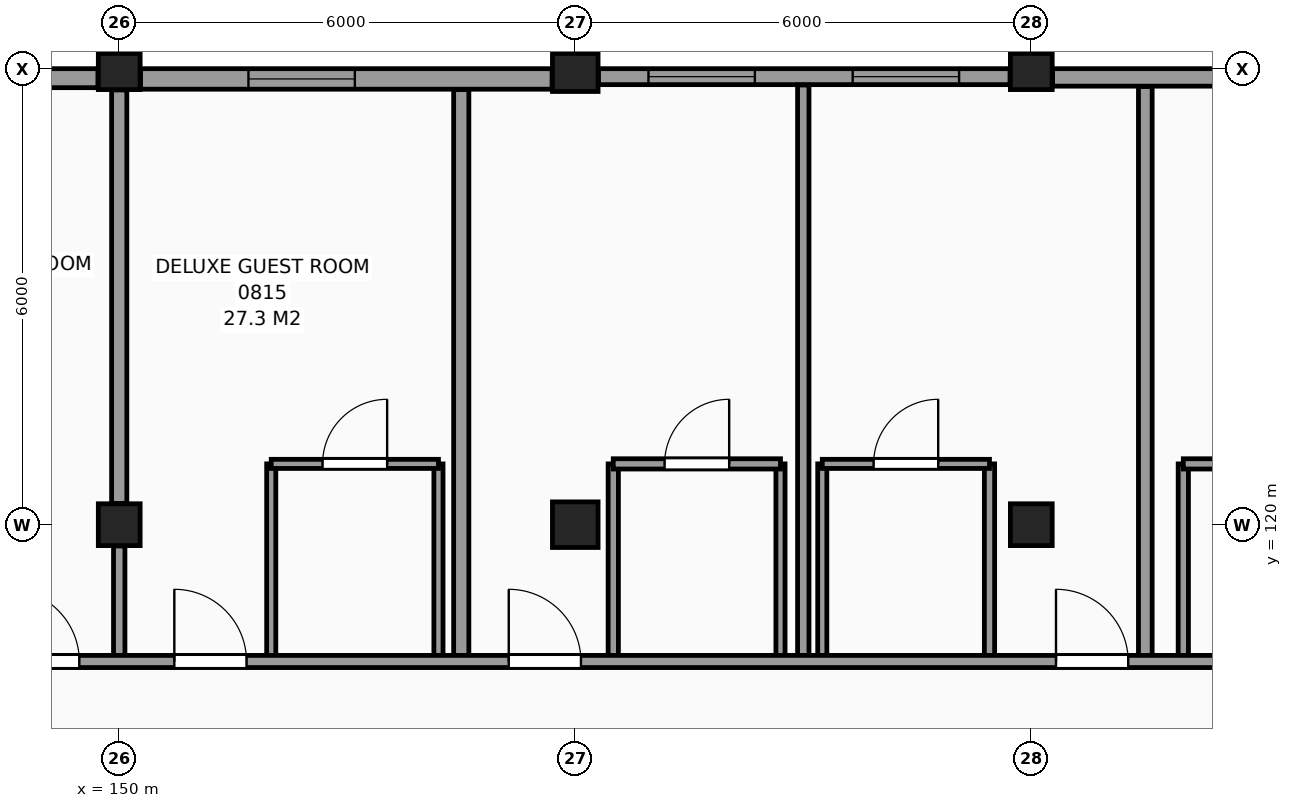
"""IFC4 building model, lengths in metres.
Left out: names, types, materials, properties, quantities, classifications, styles, units other than length and angle.
Written with IfcOpenShell. Run it as: python <this file> out.ifc"""

import sys

from ifc_helpers import new_model, si_unit, direction, frame, frame_2d, origin, origin_2d, place, context, subcontext, project, spatial, rectangle, extrude, element, fill, save


model = new_model("IFC4")
c1 = context("Model", 3, precision=1e-05, world=origin(), true_north=direction((0.0, 1.0)))
c2 = subcontext(c1, "Body", "Model", "MODEL_VIEW")
j1 = project(units=[si_unit("LENGTHUNIT", "METRE"), si_unit("PLANEANGLEUNIT", "RADIAN")], contexts=[c1])
p1 = place(None, origin())
s1 = spatial("IfcSite", under=j1, at=p1, CompositionType="ELEMENT")
p2 = place(p1, origin())
s2 = spatial("IfcBuilding", under=s1, at=p2, CompositionType="ELEMENT")
p3 = place(p2, frame((0.0, 0.0, 34.8)))
s3 = spatial("IfcBuildingStorey", under=s2, at=p3, CompositionType="ELEMENT", Elevation=34.8)
for number, where, z_axis, x_axis in (
    (1, (150.0, 120.0, 0.0), (0.0, 0.0, 1.0), (1.0, 0.0, 0.0)),
    (2, (150.0, 126.0, 0.0), (0.0, 0.0, 1.0), (1.0, 0.0, 0.0)),
):
    element("IfcColumn", number, at=place(p3, frame(where, z_axis=z_axis, x_axis=x_axis)), inside=s3, PredefinedType="COLUMN", context=c2, shape_type="SweptSolid", body=[
        extrude(rectangle(XDim=0.55, YDim=0.55, at=origin_2d()), origin(), (0.0, 0.0, 1.0), 3.3),
    ])
for number, where, z_axis, x_axis in (
    (3, (156.0, 120.0, 0.0), (0.0, 0.0, 1.0), (1.0, 0.0, 0.0)),
    (4, (156.0, 126.0, 0.0), (0.0, 0.0, 1.0), (1.0, 0.0, 0.0)),
):
    element("IfcColumn", number, at=place(p3, frame(where, z_axis=z_axis, x_axis=x_axis)), inside=s3, PredefinedType="COLUMN", context=c2, shape_type="SweptSolid", body=[
        extrude(rectangle(XDim=0.6, YDim=0.6, at=origin_2d()), origin(), (0.0, 0.0, 1.0), 3.3),
    ])
for number, where, z_axis, x_axis in (
    (5, (162.0, 120.0, 0.0), (0.0, 0.0, 1.0), (1.0, 0.0, 0.0)),
    (6, (162.0, 126.0, 0.0), (0.0, 0.0, 1.0), (1.0, 0.0, 0.0)),
):
    element("IfcColumn", number, at=place(p3, frame(where, z_axis=z_axis, x_axis=x_axis)), inside=s3, PredefinedType="COLUMN", context=c2, shape_type="SweptSolid", body=[
        extrude(rectangle(XDim=0.55, YDim=0.55, at=origin_2d()), origin(), (0.0, 0.0, 1.0), 3.3),
    ])
p4 = place(p3, frame((167.695, 125.885, 0.0), z_axis=(0.0, 0.0, 1.0), x_axis=(-1.0, 0.0, 0.0)))
e7 = element("IfcWall", 7, at=p4, inside=s3, PredefinedType="SOLIDWALL", context=c2, shape_type="SweptSolid", body=[
    extrude(rectangle(XDim=5.415, YDim=0.23, at=frame_2d((2.708, 0.0))), origin(), (0.0, 0.0, 1.0), 2.42),
])
p5 = place(p3, frame((161.72, 125.895, 0.0), z_axis=(0.0, 0.0, 1.0), x_axis=(-1.0, 0.0, 0.0)))
e8 = element("IfcWall", 8, at=p5, inside=s3, PredefinedType="SOLIDWALL", context=c2, shape_type="SweptSolid", body=[
    extrude(rectangle(XDim=5.415, YDim=0.21, at=frame_2d((2.708, 0.0))), origin(), (0.0, 0.0, 1.0), 2.42),
])
p6 = place(p5, frame((3.357, 0.0, 0.8)))
e9 = element("IfcOpeningElement", 9, at=p6, cuts=e8, PredefinedType="OPENING", context=c2, shape_type="SweptSolid", body=[
    extrude(rectangle(XDim=1.4, YDim=1.4, at=frame_2d((0.7, 0.7))), frame((0.0, 0.115, 0.0), z_axis=(0.0, -1.0, 0.0), x_axis=(1.0, 0.0, 0.0)), (0.0, 0.0, 1.0), 0.23),
])
p7 = place(p5, frame((0.67, 0.0, 0.8)))
e10 = element("IfcOpeningElement", 10, at=p7, cuts=e8, PredefinedType="OPENING", context=c2, shape_type="SweptSolid", body=[
    extrude(rectangle(XDim=1.4, YDim=1.4, at=frame_2d((0.7, 0.7))), frame((0.0, 0.115, 0.0), z_axis=(0.0, -1.0, 0.0), x_axis=(1.0, 0.0, 0.0)), (0.0, 0.0, 1.0), 0.23),
])
p8 = place(p3, frame((155.695, 125.865, 0.0), z_axis=(0.0, 0.0, 1.0), x_axis=(-1.0, 0.0, 0.0)))
e11 = element("IfcWall", 11, at=p8, inside=s3, PredefinedType="SOLIDWALL", context=c2, shape_type="SweptSolid", body=[
    extrude(rectangle(XDim=5.415, YDim=0.27, at=frame_2d((2.708, 0.0))), origin(), (0.0, 0.0, 1.0), 2.42),
])
p9 = place(p8, frame((2.595, 0.0, 0.8)))
e12 = element("IfcOpeningElement", 12, at=p9, cuts=e11, PredefinedType="OPENING", context=c2, shape_type="SweptSolid", body=[
    extrude(rectangle(XDim=1.4, YDim=1.4, at=frame_2d((0.7, 0.7))), frame((0.0, 0.145, 0.0), z_axis=(0.0, -1.0, 0.0), x_axis=(1.0, 0.0, 0.0)), (0.0, 0.0, 1.0), 0.29),
])
p10 = place(p3, frame((149.72, 125.875, 0.0), z_axis=(0.0, 0.0, 1.0), x_axis=(-1.0, 0.0, 0.0)))
e13 = element("IfcWall", 13, at=p10, inside=s3, PredefinedType="SOLIDWALL", context=c2, shape_type="SweptSolid", body=[
    extrude(rectangle(XDim=5.415, YDim=0.25, at=frame_2d((2.708, 0.0))), origin(), (0.0, 0.0, 1.0), 2.42),
])
p11 = place(p10, frame((1.42, 0.0, 0.8)))
e14 = element("IfcOpeningElement", 14, at=p11, cuts=e13, PredefinedType="OPENING", context=c2, shape_type="SweptSolid", body=[
    extrude(rectangle(XDim=1.4, YDim=1.4, at=frame_2d((0.7, 0.7))), frame((0.0, 0.135, 0.0), z_axis=(0.0, -1.0, 0.0), x_axis=(1.0, 0.0, 0.0)), (0.0, 0.0, 1.0), 0.27),
])
p12 = place(p3, frame((150.0, 118.2, 0.0), z_axis=(0.0, 0.0, 1.0), x_axis=(0.0, 1.0, 0.0)))
e15 = element("IfcWall", 15, at=p12, inside=s3, PredefinedType="PARTITIONING", context=c2, shape_type="SweptSolid", body=[
    extrude(rectangle(XDim=1.52, YDim=0.15, at=frame_2d((0.76, 0.0))), origin(), (0.0, 0.0, 1.0), 2.57),
])
p13 = place(p3, frame((150.0, 120.28, 0.0), z_axis=(0.0, 0.0, 1.0), x_axis=(0.0, 1.0, 0.0)))
e16 = element("IfcWall", 16, at=p13, inside=s3, PredefinedType="PARTITIONING", context=c2, shape_type="SweptSolid", body=[
    extrude(rectangle(XDim=5.44, YDim=0.2, at=frame_2d((2.72, 0.0))), origin(), (0.0, 0.0, 1.0), 2.73),
])
for number, where, z_axis, x_axis in (
    (17, (152.0, 118.2, 0.0), (0.0, 0.0, 1.0), (0.0, 1.0, 0.0)),
    (18, (154.2, 118.2, 0.0), (0.0, 0.0, 1.0), (0.0, 1.0, 0.0)),
):
    element("IfcWall", number, at=place(p3, frame(where, z_axis=z_axis, x_axis=x_axis)), inside=s3, PredefinedType="PARTITIONING", context=c2, shape_type="SweptSolid", body=[
        extrude(rectangle(XDim=2.6, YDim=0.12, at=frame_2d((1.3, 0.0))), origin(), (0.0, 0.0, 1.0), 3.07),
    ])
p14 = place(p3, frame((154.5, 118.2, 0.0), z_axis=(0.0, 0.0, 1.0), x_axis=(0.0, 1.0, 0.0)))
e19 = element("IfcWall", 19, at=p14, inside=s3, PredefinedType="PARTITIONING", context=c2, shape_type="SweptSolid", body=[
    extrude(rectangle(XDim=7.525, YDim=0.2, at=frame_2d((3.763, 0.0))), origin(), (0.0, 0.0, 1.0), 3.07),
])
p15 = place(p3, frame((156.5, 118.2, 0.0), z_axis=(0.0, 0.0, 1.0), x_axis=(0.0, 1.0, 0.0)))
e20 = element("IfcWall", 20, at=p15, inside=s3, PredefinedType="PARTITIONING", context=c2, shape_type="SweptSolid", body=[
    extrude(rectangle(XDim=2.6, YDim=0.135, at=frame_2d((1.3, 0.0))), origin(), (0.0, 0.0, 1.0), 3.07),
])
p16 = place(p3, frame((158.7, 118.2, 0.0), z_axis=(0.0, 0.0, 1.0), x_axis=(0.0, 1.0, 0.0)))
e21 = element("IfcWall", 21, at=p16, inside=s3, PredefinedType="PARTITIONING", context=c2, shape_type="SweptSolid", body=[
    extrude(rectangle(XDim=2.6, YDim=0.12, at=frame_2d((1.3, 0.0))), origin(), (0.0, 0.0, 1.0), 3.07),
])
p17 = place(p3, frame((159.0, 118.2, 0.0), z_axis=(0.0, 0.0, 1.0), x_axis=(0.0, 1.0, 0.0)))
e22 = element("IfcWall", 22, at=p17, inside=s3, PredefinedType="PARTITIONING", context=c2, shape_type="SweptSolid", body=[
    extrude(rectangle(XDim=7.585, YDim=0.15, at=frame_2d((3.792, 0.0))), origin(), (0.0, 0.0, 1.0), 3.07),
])
p18 = place(p3, frame((159.25, 118.2, 0.0), z_axis=(0.0, 0.0, 1.0), x_axis=(0.0, 1.0, 0.0)))
e23 = element("IfcWall", 23, at=p18, inside=s3, PredefinedType="PARTITIONING", context=c2, shape_type="SweptSolid", body=[
    extrude(rectangle(XDim=2.6, YDim=0.12, at=frame_2d((1.3, 0.0))), origin(), (0.0, 0.0, 1.0), 3.07),
])
p19 = place(p3, frame((161.45, 118.2, 0.0), z_axis=(0.0, 0.0, 1.0), x_axis=(0.0, 1.0, 0.0)))
e24 = element("IfcWall", 24, at=p19, inside=s3, PredefinedType="PARTITIONING", context=c2, shape_type="SweptSolid", body=[
    extrude(rectangle(XDim=2.6, YDim=0.135, at=frame_2d((1.3, 0.0))), origin(), (0.0, 0.0, 1.0), 3.07),
])
p20 = place(p3, frame((163.5, 118.2, 0.0), z_axis=(0.0, 0.0, 1.0), x_axis=(0.0, 1.0, 0.0)))
e25 = element("IfcWall", 25, at=p20, inside=s3, PredefinedType="PARTITIONING", context=c2, shape_type="SweptSolid", body=[
    extrude(rectangle(XDim=7.565, YDim=0.18, at=frame_2d((3.782, 0.0))), origin(), (0.0, 0.0, 1.0), 3.07),
])
p21 = place(p3, frame((164.0, 118.2, 0.0), z_axis=(0.0, 0.0, 1.0), x_axis=(0.0, 1.0, 0.0)))
e26 = element("IfcWall", 26, at=p21, inside=s3, PredefinedType="PARTITIONING", context=c2, shape_type="SweptSolid", body=[
    extrude(rectangle(XDim=2.6, YDim=0.135, at=frame_2d((1.3, 0.0))), origin(), (0.0, 0.0, 1.0), 3.07),
])
p22 = place(p3, frame((66.275, 118.2, 0.0), z_axis=(0.0, 0.0, 1.0), x_axis=(1.0, 0.0, 0.0)))
e27 = element("IfcWall", 27, at=p22, inside=s3, PredefinedType="PARTITIONING", context=c2, shape_type="SweptSolid", body=[
    extrude(rectangle(XDim=110.225, YDim=0.16, at=frame_2d((55.113, 0.0))), origin(), (0.0, 0.0, 1.0), 3.07),
])
p23 = place(p22, frame((0.45, 0.0, 0.0)))
e28 = element("IfcOpeningElement", 28, at=p23, cuts=e27, PredefinedType="OPENING", context=c2, shape_type="SweptSolid", body=[
    extrude(rectangle(XDim=0.95, YDim=2.1, at=frame_2d((0.475, 1.05))), frame((0.0, 0.09, 0.0), z_axis=(0.0, -1.0, 0.0), x_axis=(1.0, 0.0, 0.0)), (0.0, 0.0, 1.0), 0.18),
])
p24 = place(p22, frame((4.85, 0.0, 0.0)))
e29 = element("IfcOpeningElement", 29, at=p24, cuts=e27, PredefinedType="OPENING", context=c2, shape_type="SweptSolid", body=[
    extrude(rectangle(XDim=0.95, YDim=2.1, at=frame_2d((0.475, 1.05))), frame((0.0, 0.09, 0.0), z_axis=(0.0, -1.0, 0.0), x_axis=(1.0, 0.0, 0.0)), (0.0, 0.0, 1.0), 0.18),
])
p25 = place(p22, frame((9.35, 0.0, 0.0)))
e30 = element("IfcOpeningElement", 30, at=p25, cuts=e27, PredefinedType="OPENING", context=c2, shape_type="SweptSolid", body=[
    extrude(rectangle(XDim=0.95, YDim=2.1, at=frame_2d((0.475, 1.05))), frame((0.0, 0.09, 0.0), z_axis=(0.0, -1.0, 0.0), x_axis=(1.0, 0.0, 0.0)), (0.0, 0.0, 1.0), 0.18),
])
p26 = place(p22, frame((18.45, 0.0, 0.0)))
e31 = element("IfcOpeningElement", 31, at=p26, cuts=e27, PredefinedType="OPENING", context=c2, shape_type="SweptSolid", body=[
    extrude(rectangle(XDim=0.95, YDim=2.1, at=frame_2d((0.475, 1.05))), frame((0.0, 0.09, 0.0), z_axis=(0.0, -1.0, 0.0), x_axis=(1.0, 0.0, 0.0)), (0.0, 0.0, 1.0), 0.18),
])
p27 = place(p22, frame((22.85, 0.0, 0.0)))
e32 = element("IfcOpeningElement", 32, at=p27, cuts=e27, PredefinedType="OPENING", context=c2, shape_type="SweptSolid", body=[
    extrude(rectangle(XDim=0.95, YDim=2.1, at=frame_2d((0.475, 1.05))), frame((0.0, 0.09, 0.0), z_axis=(0.0, -1.0, 0.0), x_axis=(1.0, 0.0, 0.0)), (0.0, 0.0, 1.0), 0.18),
])
p28 = place(p22, frame((27.35, 0.0, 0.0)))
e33 = element("IfcOpeningElement", 33, at=p28, cuts=e27, PredefinedType="OPENING", context=c2, shape_type="SweptSolid", body=[
    extrude(rectangle(XDim=0.95, YDim=2.1, at=frame_2d((0.475, 1.05))), frame((0.0, 0.09, 0.0), z_axis=(0.0, -1.0, 0.0), x_axis=(1.0, 0.0, 0.0)), (0.0, 0.0, 1.0), 0.18),
])
p29 = place(p22, frame((42.05, 0.0, 0.0)))
e34 = element("IfcOpeningElement", 34, at=p29, cuts=e27, PredefinedType="OPENING", context=c2, shape_type="SweptSolid", body=[
    extrude(rectangle(XDim=0.95, YDim=2.1, at=frame_2d((0.475, 1.05))), frame((0.0, 0.09, 0.0), z_axis=(0.0, -1.0, 0.0), x_axis=(1.0, 0.0, 0.0)), (0.0, 0.0, 1.0), 0.18),
])
p30 = place(p22, frame((50.3, 0.0, 0.0)))
e35 = element("IfcOpeningElement", 35, at=p30, cuts=e27, PredefinedType="OPENING", context=c2, shape_type="SweptSolid", body=[
    extrude(rectangle(XDim=0.95, YDim=2.1, at=frame_2d((0.475, 1.05))), frame((0.0, 0.09, 0.0), z_axis=(0.0, -1.0, 0.0), x_axis=(1.0, 0.0, 0.0)), (0.0, 0.0, 1.0), 0.18),
])
p31 = place(p22, frame((52.85, 0.0, 0.0)))
e36 = element("IfcOpeningElement", 36, at=p31, cuts=e27, PredefinedType="OPENING", context=c2, shape_type="SweptSolid", body=[
    extrude(rectangle(XDim=0.95, YDim=2.1, at=frame_2d((0.475, 1.05))), frame((0.0, 0.09, 0.0), z_axis=(0.0, -1.0, 0.0), x_axis=(1.0, 0.0, 0.0)), (0.0, 0.0, 1.0), 0.18),
])
p32 = place(p22, frame((60.05, 0.0, 0.0)))
e37 = element("IfcOpeningElement", 37, at=p32, cuts=e27, PredefinedType="OPENING", context=c2, shape_type="SweptSolid", body=[
    extrude(rectangle(XDim=0.95, YDim=2.1, at=frame_2d((0.475, 1.05))), frame((0.0, 0.09, 0.0), z_axis=(0.0, -1.0, 0.0), x_axis=(1.0, 0.0, 0.0)), (0.0, 0.0, 1.0), 0.18),
])
p33 = place(p22, frame((64.25, 0.0, 0.0)))
e38 = element("IfcOpeningElement", 38, at=p33, cuts=e27, PredefinedType="OPENING", context=c2, shape_type="SweptSolid", body=[
    extrude(rectangle(XDim=0.95, YDim=2.1, at=frame_2d((0.475, 1.05))), frame((0.0, 0.09, 0.0), z_axis=(0.0, -1.0, 0.0), x_axis=(1.0, 0.0, 0.0)), (0.0, 0.0, 1.0), 0.18),
])
p34 = place(p22, frame((66.45, 0.0, 0.0)))
e39 = element("IfcOpeningElement", 39, at=p34, cuts=e27, PredefinedType="OPENING", context=c2, shape_type="SweptSolid", body=[
    extrude(rectangle(XDim=0.95, YDim=2.1, at=frame_2d((0.475, 1.05))), frame((0.0, 0.09, 0.0), z_axis=(0.0, -1.0, 0.0), x_axis=(1.0, 0.0, 0.0)), (0.0, 0.0, 1.0), 0.18),
])
p35 = place(p22, frame((72.45, 0.0, 0.0)))
e40 = element("IfcOpeningElement", 40, at=p35, cuts=e27, PredefinedType="OPENING", context=c2, shape_type="SweptSolid", body=[
    extrude(rectangle(XDim=0.95, YDim=2.1, at=frame_2d((0.475, 1.05))), frame((0.0, 0.09, 0.0), z_axis=(0.0, -1.0, 0.0), x_axis=(1.0, 0.0, 0.0)), (0.0, 0.0, 1.0), 0.18),
])
p36 = place(p22, frame((82.25, 0.0, 0.0)))
e41 = element("IfcOpeningElement", 41, at=p36, cuts=e27, PredefinedType="OPENING", context=c2, shape_type="SweptSolid", body=[
    extrude(rectangle(XDim=0.95, YDim=2.1, at=frame_2d((0.475, 1.05))), frame((0.0, 0.09, 0.0), z_axis=(0.0, -1.0, 0.0), x_axis=(1.0, 0.0, 0.0)), (0.0, 0.0, 1.0), 0.18),
])
p37 = place(p22, frame((84.45, 0.0, 0.0)))
e42 = element("IfcOpeningElement", 42, at=p37, cuts=e27, PredefinedType="OPENING", context=c2, shape_type="SweptSolid", body=[
    extrude(rectangle(XDim=0.95, YDim=2.1, at=frame_2d((0.475, 1.05))), frame((0.0, 0.09, 0.0), z_axis=(0.0, -1.0, 0.0), x_axis=(1.0, 0.0, 0.0)), (0.0, 0.0, 1.0), 0.18),
])
p38 = place(p22, frame((88.85, 0.0, 0.0)))
e43 = element("IfcOpeningElement", 43, at=p38, cuts=e27, PredefinedType="OPENING", context=c2, shape_type="SweptSolid", body=[
    extrude(rectangle(XDim=0.95, YDim=2.1, at=frame_2d((0.475, 1.05))), frame((0.0, 0.09, 0.0), z_axis=(0.0, -1.0, 0.0), x_axis=(1.0, 0.0, 0.0)), (0.0, 0.0, 1.0), 0.18),
])
p39 = place(p22, frame((96.05, 0.0, 0.0)))
e44 = element("IfcOpeningElement", 44, at=p39, cuts=e27, PredefinedType="OPENING", context=c2, shape_type="SweptSolid", body=[
    extrude(rectangle(XDim=0.95, YDim=2.1, at=frame_2d((0.475, 1.05))), frame((0.0, 0.09, 0.0), z_axis=(0.0, -1.0, 0.0), x_axis=(1.0, 0.0, 0.0)), (0.0, 0.0, 1.0), 0.18),
])
p40 = place(p22, frame((104.3, 0.0, 0.0)))
e45 = element("IfcOpeningElement", 45, at=p40, cuts=e27, PredefinedType="OPENING", context=c2, shape_type="SweptSolid", body=[
    extrude(rectangle(XDim=0.95, YDim=2.1, at=frame_2d((0.475, 1.05))), frame((0.0, 0.09, 0.0), z_axis=(0.0, -1.0, 0.0), x_axis=(1.0, 0.0, 0.0)), (0.0, 0.0, 1.0), 0.18),
])
p41 = place(p22, frame((108.45, 0.0, 0.0)))
e46 = element("IfcOpeningElement", 46, at=p41, cuts=e27, PredefinedType="OPENING", context=c2, shape_type="SweptSolid", body=[
    extrude(rectangle(XDim=0.95, YDim=2.1, at=frame_2d((0.475, 1.05))), frame((0.0, 0.09, 0.0), z_axis=(0.0, -1.0, 0.0), x_axis=(1.0, 0.0, 0.0)), (0.0, 0.0, 1.0), 0.18),
])
p42 = place(p3, frame((152.0, 120.8, 0.0), z_axis=(0.0, 0.0, 1.0), x_axis=(1.0, 0.0, 0.0)))
e47 = element("IfcWall", 47, at=p42, inside=s3, PredefinedType="PARTITIONING", context=c2, shape_type="SweptSolid", body=[
    extrude(rectangle(XDim=2.2, YDim=0.12, at=frame_2d((1.1, 0.0))), origin(), (0.0, 0.0, 1.0), 3.07),
])
p43 = place(p42, frame((0.675, 0.0, 0.0)))
e48 = element("IfcOpeningElement", 48, at=p43, cuts=e47, PredefinedType="OPENING", context=c2, shape_type="SweptSolid", body=[
    extrude(rectangle(XDim=0.85, YDim=2.1, at=frame_2d((0.425, 1.05))), frame((0.0, 0.07, 0.0), z_axis=(0.0, -1.0, 0.0), x_axis=(1.0, 0.0, 0.0)), (0.0, 0.0, 1.0), 0.14),
])
p44 = place(p3, frame((156.5, 120.8, 0.0), z_axis=(0.0, 0.0, 1.0), x_axis=(1.0, 0.0, 0.0)))
e49 = element("IfcWall", 49, at=p44, inside=s3, PredefinedType="PARTITIONING", context=c2, shape_type="SweptSolid", body=[
    extrude(rectangle(XDim=2.2, YDim=0.135, at=frame_2d((1.1, 0.0))), origin(), (0.0, 0.0, 1.0), 3.07),
])
p45 = place(p44, frame((0.675, 0.0, 0.0)))
e50 = element("IfcOpeningElement", 50, at=p45, cuts=e49, PredefinedType="OPENING", context=c2, shape_type="SweptSolid", body=[
    extrude(rectangle(XDim=0.85, YDim=2.1, at=frame_2d((0.425, 1.05))), frame((0.0, 0.078, 0.0), z_axis=(0.0, -1.0, 0.0), x_axis=(1.0, 0.0, 0.0)), (0.0, 0.0, 1.0), 0.155),
])
p46 = place(p3, frame((159.25, 120.8, 0.0), z_axis=(0.0, 0.0, 1.0), x_axis=(1.0, 0.0, 0.0)))
e51 = element("IfcWall", 51, at=p46, inside=s3, PredefinedType="PARTITIONING", context=c2, shape_type="SweptSolid", body=[
    extrude(rectangle(XDim=2.2, YDim=0.12, at=frame_2d((1.1, 0.0))), origin(), (0.0, 0.0, 1.0), 3.07),
])
p47 = place(p46, frame((0.675, 0.0, 0.0)))
e52 = element("IfcOpeningElement", 52, at=p47, cuts=e51, PredefinedType="OPENING", context=c2, shape_type="SweptSolid", body=[
    extrude(rectangle(XDim=0.85, YDim=2.1, at=frame_2d((0.425, 1.05))), frame((0.0, 0.07, 0.0), z_axis=(0.0, -1.0, 0.0), x_axis=(1.0, 0.0, 0.0)), (0.0, 0.0, 1.0), 0.14),
])
p48 = place(p3, frame((164.0, 120.8, 0.0), z_axis=(0.0, 0.0, 1.0), x_axis=(1.0, 0.0, 0.0)))
e53 = element("IfcWall", 53, at=p48, inside=s3, PredefinedType="PARTITIONING", context=c2, shape_type="SweptSolid", body=[
    extrude(rectangle(XDim=2.2, YDim=0.135, at=frame_2d((1.1, 0.0))), origin(), (0.0, 0.0, 1.0), 3.07),
])
p49 = place(p48, frame((0.675, 0.0, 0.0)))
e54 = element("IfcOpeningElement", 54, at=p49, cuts=e53, PredefinedType="OPENING", context=c2, shape_type="SweptSolid", body=[
    extrude(rectangle(XDim=0.85, YDim=2.1, at=frame_2d((0.425, 1.05))), frame((0.0, 0.078, 0.0), z_axis=(0.0, -1.0, 0.0), x_axis=(1.0, 0.0, 0.0)), (0.0, 0.0, 1.0), 0.155),
])
p50 = place(p9, origin())
e55 = element("IfcWindow", 55, at=p50, inside=s3, PartitioningType="SINGLE_PANEL", PredefinedType="WINDOW", context=c2, shape_type="SweptSolid", body=[
    extrude(rectangle(XDim=1.4, YDim=1.4, at=frame_2d((0.7, 0.7))), frame((0.0, 0.03, 0.0), z_axis=(0.0, -1.0, 0.0), x_axis=(1.0, 0.0, 0.0)), (0.0, 0.0, 1.0), 0.06),
])
fill(e12, e55)
p51 = place(p6, origin())
e56 = element("IfcWindow", 56, at=p51, inside=s3, PartitioningType="SINGLE_PANEL", PredefinedType="WINDOW", context=c2, shape_type="SweptSolid", body=[
    extrude(rectangle(XDim=1.4, YDim=1.4, at=frame_2d((0.7, 0.7))), frame((0.0, 0.03, 0.0), z_axis=(0.0, -1.0, 0.0), x_axis=(1.0, 0.0, 0.0)), (0.0, 0.0, 1.0), 0.06),
])
fill(e9, e56)
p52 = place(p7, origin())
e57 = element("IfcWindow", 57, at=p52, inside=s3, PartitioningType="SINGLE_PANEL", PredefinedType="WINDOW", context=c2, shape_type="SweptSolid", body=[
    extrude(rectangle(XDim=1.4, YDim=1.4, at=frame_2d((0.7, 0.7))), frame((0.0, 0.03, 0.0), z_axis=(0.0, -1.0, 0.0), x_axis=(1.0, 0.0, 0.0)), (0.0, 0.0, 1.0), 0.06),
])
fill(e10, e57)
p53 = place(p36, origin())
e58 = element("IfcDoor", 58, at=p53, inside=s3, OperationType="SINGLE_SWING_LEFT", PredefinedType="DOOR", context=c2, shape_type="SweptSolid", body=[
    extrude(rectangle(XDim=0.95, YDim=2.1, at=frame_2d((0.475, 1.05))), frame((0.0, 0.025, 0.0), z_axis=(0.0, -1.0, 0.0), x_axis=(1.0, 0.0, 0.0)), (0.0, 0.0, 1.0), 0.05),
])
fill(e41, e58)
p54 = place(p43, origin())
e59 = element("IfcDoor", 59, at=p54, inside=s3, OperationType="SINGLE_SWING_RIGHT", PredefinedType="DOOR", context=c2, shape_type="SweptSolid", body=[
    extrude(rectangle(XDim=0.85, YDim=2.1, at=frame_2d((0.425, 1.05))), frame((0.0, 0.025, 0.0), z_axis=(0.0, -1.0, 0.0), x_axis=(1.0, 0.0, 0.0)), (0.0, 0.0, 1.0), 0.05),
])
fill(e48, e59)
p55 = place(p37, origin())
e60 = element("IfcDoor", 60, at=p55, inside=s3, OperationType="SINGLE_SWING_LEFT", PredefinedType="DOOR", context=c2, shape_type="SweptSolid", body=[
    extrude(rectangle(XDim=0.95, YDim=2.1, at=frame_2d((0.475, 1.05))), frame((0.0, 0.025, 0.0), z_axis=(0.0, -1.0, 0.0), x_axis=(1.0, 0.0, 0.0)), (0.0, 0.0, 1.0), 0.05),
])
fill(e42, e60)
p56 = place(p45, origin())
e61 = element("IfcDoor", 61, at=p56, inside=s3, OperationType="SINGLE_SWING_RIGHT", PredefinedType="DOOR", context=c2, shape_type="SweptSolid", body=[
    extrude(rectangle(XDim=0.85, YDim=2.1, at=frame_2d((0.425, 1.05))), frame((0.0, 0.025, 0.0), z_axis=(0.0, -1.0, 0.0), x_axis=(1.0, 0.0, 0.0)), (0.0, 0.0, 1.0), 0.05),
])
fill(e50, e61)
p57 = place(p38, origin())
e62 = element("IfcDoor", 62, at=p57, inside=s3, OperationType="SINGLE_SWING_LEFT", PredefinedType="DOOR", context=c2, shape_type="SweptSolid", body=[
    extrude(rectangle(XDim=0.95, YDim=2.1, at=frame_2d((0.475, 1.05))), frame((0.0, 0.025, 0.0), z_axis=(0.0, -1.0, 0.0), x_axis=(1.0, 0.0, 0.0)), (0.0, 0.0, 1.0), 0.05),
])
fill(e43, e62)
p58 = place(p47, origin())
e63 = element("IfcDoor", 63, at=p58, inside=s3, OperationType="SINGLE_SWING_RIGHT", PredefinedType="DOOR", context=c2, shape_type="SweptSolid", body=[
    extrude(rectangle(XDim=0.85, YDim=2.1, at=frame_2d((0.425, 1.05))), frame((0.0, 0.025, 0.0), z_axis=(0.0, -1.0, 0.0), x_axis=(1.0, 0.0, 0.0)), (0.0, 0.0, 1.0), 0.05),
])
fill(e52, e63)
p59 = place(p39, origin())
e64 = element("IfcDoor", 64, at=p59, inside=s3, OperationType="SINGLE_SWING_LEFT", PredefinedType="DOOR", context=c2, shape_type="SweptSolid", body=[
    extrude(rectangle(XDim=0.95, YDim=2.1, at=frame_2d((0.475, 1.05))), frame((0.0, 0.025, 0.0), z_axis=(0.0, -1.0, 0.0), x_axis=(1.0, 0.0, 0.0)), (0.0, 0.0, 1.0), 0.05),
])
fill(e44, e64)
save(model, sys.argv[1])
